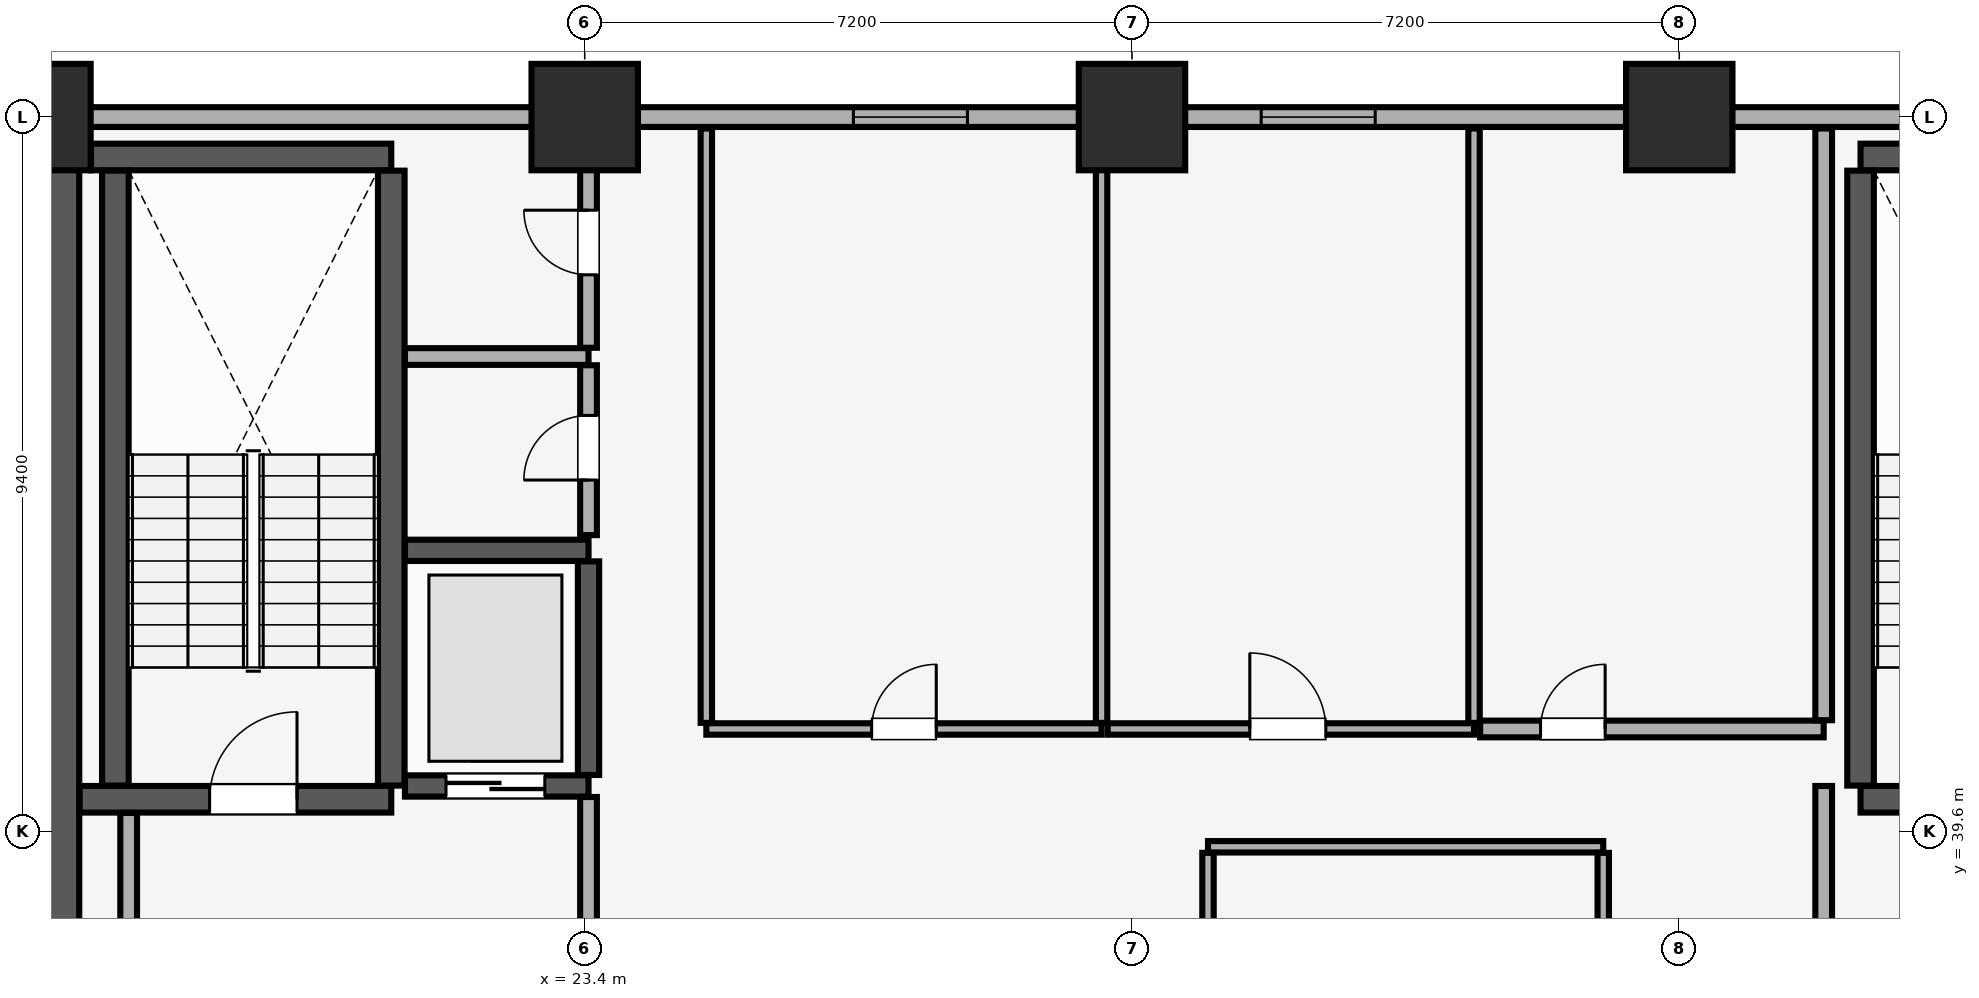
"""IFC4 building model, lengths in metres.
Left out: names, types, materials, properties, quantities, classifications, styles, units other than length and angle.
Written with IfcOpenShell. Run it as: python <this file> out.ifc"""

import sys

from ifc_helpers import new_model, si_unit, direction, frame, frame_2d, origin, origin_2d, place, context, subcontext, project, spatial, rectangle, extrude, element, fill, save


model = new_model("IFC4")
c1 = context("Model", 3, precision=1e-05, world=origin(), true_north=direction((0.0, 1.0)))
c2 = subcontext(c1, "Body", "Model", "MODEL_VIEW")
j1 = project(units=[si_unit("LENGTHUNIT", "METRE"), si_unit("PLANEANGLEUNIT", "RADIAN")], contexts=[c1])
p1 = place(None, origin())
s1 = spatial("IfcSite", under=j1, at=p1, CompositionType="ELEMENT")
p2 = place(p1, origin())
s2 = spatial("IfcBuilding", under=s1, at=p2, CompositionType="ELEMENT")
p3 = place(p2, frame((0.0, 0.0, 68.9)))
s3 = spatial("IfcBuildingStorey", under=s2, at=p3, CompositionType="ELEMENT", Elevation=68.9)
for number, where, z_axis, x_axis in (
    (1, (16.2, 49.0, 0.0), (0.0, 0.0, 1.0), (1.0, 0.0, 0.0)),
    (2, (23.4, 49.0, 0.0), (0.0, 0.0, 1.0), (1.0, 0.0, 0.0)),
    (3, (30.6, 49.0, 0.0), (0.0, 0.0, 1.0), (1.0, 0.0, 0.0)),
    (4, (37.8, 49.0, 0.0), (0.0, 0.0, 1.0), (1.0, 0.0, 0.0)),
):
    element("IfcColumn", number, at=place(p3, frame(where, z_axis=z_axis, x_axis=x_axis)), inside=s3, PredefinedType="COLUMN", context=c2, shape_type="SweptSolid", body=[
        extrude(rectangle(XDim=1.4, YDim=1.4, at=origin_2d()), origin(), (0.0, 0.0, 1.0), 3.51),
    ])
p4 = place(p3, frame((79.8, 49.0, 0.0), z_axis=(0.0, 0.0, 1.0), x_axis=(-1.0, 0.0, 0.0)))
e5 = element("IfcWall", 5, at=p4, inside=s3, PredefinedType="SOLIDWALL", context=c2, shape_type="SweptSolid", body=[
    extrude(rectangle(XDim=75.6, YDim=0.26, at=frame_2d((37.8, 0.0))), origin(), (0.0, 0.0, 1.0), 2.56),
])
p5 = place(p4, frame((72.565, 0.0, 0.85)))
e6 = element("IfcOpeningElement", 6, at=p5, cuts=e5, PredefinedType="OPENING", context=c2, shape_type="SweptSolid", body=[
    extrude(rectangle(XDim=1.5, YDim=1.4, at=frame_2d((0.75, 0.7))), frame((0.0, 0.14, 0.0), z_axis=(0.0, -1.0, 0.0), x_axis=(1.0, 0.0, 0.0)), (0.0, 0.0, 1.0), 0.28),
])
p6 = place(p4, frame((67.45, 0.0, 0.85)))
e7 = element("IfcOpeningElement", 7, at=p6, cuts=e5, PredefinedType="OPENING", context=c2, shape_type="SweptSolid", body=[
    extrude(rectangle(XDim=1.5, YDim=1.4, at=frame_2d((0.75, 0.7))), frame((0.0, 0.14, 0.0), z_axis=(0.0, -1.0, 0.0), x_axis=(1.0, 0.0, 0.0)), (0.0, 0.0, 1.0), 0.28),
])
p7 = place(p4, frame((6.65, 0.0, 0.85)))
e8 = element("IfcOpeningElement", 8, at=p7, cuts=e5, PredefinedType="OPENING", context=c2, shape_type="SweptSolid", body=[
    extrude(rectangle(XDim=1.5, YDim=1.4, at=frame_2d((0.75, 0.7))), frame((0.0, 0.14, 0.0), z_axis=(0.0, -1.0, 0.0), x_axis=(1.0, 0.0, 0.0)), (0.0, 0.0, 1.0), 0.28),
])
p8 = place(p4, frame((1.535, 0.0, 0.85)))
e9 = element("IfcOpeningElement", 9, at=p8, cuts=e5, PredefinedType="OPENING", context=c2, shape_type="SweptSolid", body=[
    extrude(rectangle(XDim=1.5, YDim=1.4, at=frame_2d((0.75, 0.7))), frame((0.0, 0.14, 0.0), z_axis=(0.0, -1.0, 0.0), x_axis=(1.0, 0.0, 0.0)), (0.0, 0.0, 1.0), 0.28),
])
p9 = place(p4, frame((51.365, 0.0, 0.9)))
e10 = element("IfcOpeningElement", 10, at=p9, cuts=e5, PredefinedType="OPENING", context=c2, shape_type="SweptSolid", body=[
    extrude(rectangle(XDim=1.5, YDim=1.4, at=frame_2d((0.75, 0.7))), frame((0.0, 0.14, 0.0), z_axis=(0.0, -1.0, 0.0), x_axis=(1.0, 0.0, 0.0)), (0.0, 0.0, 1.0), 0.28),
])
p10 = place(p4, frame((46.0, 0.0, 0.9)))
e11 = element("IfcOpeningElement", 11, at=p10, cuts=e5, PredefinedType="OPENING", context=c2, shape_type="SweptSolid", body=[
    extrude(rectangle(XDim=1.5, YDim=1.4, at=frame_2d((0.75, 0.7))), frame((0.0, 0.14, 0.0), z_axis=(0.0, -1.0, 0.0), x_axis=(1.0, 0.0, 0.0)), (0.0, 0.0, 1.0), 0.28),
])
p11 = place(p4, frame((29.15, 0.0, 0.9)))
e12 = element("IfcOpeningElement", 12, at=p11, cuts=e5, PredefinedType="OPENING", context=c2, shape_type="SweptSolid", body=[
    extrude(rectangle(XDim=1.5, YDim=1.4, at=frame_2d((0.75, 0.7))), frame((0.0, 0.14, 0.0), z_axis=(0.0, -1.0, 0.0), x_axis=(1.0, 0.0, 0.0)), (0.0, 0.0, 1.0), 0.28),
])
p12 = place(p4, frame((23.485, 0.0, 0.9)))
e13 = element("IfcOpeningElement", 13, at=p12, cuts=e5, PredefinedType="OPENING", context=c2, shape_type="SweptSolid", body=[
    extrude(rectangle(XDim=1.5, YDim=1.4, at=frame_2d((0.75, 0.7))), frame((0.0, 0.14, 0.0), z_axis=(0.0, -1.0, 0.0), x_axis=(1.0, 0.0, 0.0)), (0.0, 0.0, 1.0), 0.28),
])
p13 = place(p3, frame((16.2, 29.4, 0.0), z_axis=(0.0, 0.0, 1.0), x_axis=(0.0, 1.0, 0.0)))
e14 = element("IfcWall", 14, at=p13, inside=s3, PredefinedType="SHEAR", context=c2, shape_type="SweptSolid", body=[
    extrude(rectangle(XDim=19.2, YDim=1.1, at=frame_2d((9.6, 0.0))), origin(), (0.0, 0.0, 1.0), 3.51),
])
p14 = place(p3, frame((16.755, 40.025, 0.0), z_axis=(0.0, 0.0, 1.0), x_axis=(1.0, 0.0, 0.0)))
e15 = element("IfcWall", 15, at=p14, inside=s3, PredefinedType="SHEAR", context=c2, shape_type="SweptSolid", body=[
    extrude(rectangle(XDim=4.1, YDim=0.35, at=frame_2d((2.05, 0.0))), origin(), (0.0, 0.0, 1.0), 3.51),
])
p15 = place(p14, frame((1.71, 0.0, 0.0)))
e16 = element("IfcOpeningElement", 16, at=p15, cuts=e15, PredefinedType="OPENING", context=c2, shape_type="SweptSolid", body=[
    extrude(rectangle(XDim=1.15, YDim=2.15, at=frame_2d((0.575, 1.075))), frame((0.0, 0.185, 0.0), z_axis=(0.0, -1.0, 0.0), x_axis=(1.0, 0.0, 0.0)), (0.0, 0.0, 1.0), 0.37),
])
p16 = place(p3, frame((16.905, 48.475, 0.0), z_axis=(0.0, 0.0, 1.0), x_axis=(1.0, 0.0, 0.0)))
e17 = element("IfcWall", 17, at=p16, inside=s3, PredefinedType="SHEAR", context=c2, shape_type="SweptSolid", body=[
    extrude(rectangle(XDim=3.95, YDim=0.35, at=frame_2d((1.975, 0.0))), origin(), (0.0, 0.0, 1.0), 3.51),
])
for number, where, z_axis, x_axis in (
    (18, (17.225, 40.205, 0.0), (0.0, 0.0, 1.0), (0.0, 1.0, 0.0)),
    (19, (20.855, 40.205, 0.0), (0.0, 0.0, 1.0), (0.0, 1.0, 0.0)),
):
    element("IfcWall", number, at=place(p3, frame(where, z_axis=z_axis, x_axis=x_axis)), inside=s3, PredefinedType="SHEAR", context=c2, shape_type="SweptSolid", body=[
        extrude(rectangle(XDim=8.09, YDim=0.35, at=frame_2d((4.045, 0.0))), origin(), (0.0, 0.0, 1.0), 3.51),
    ])
p17 = place(p3, frame((40.185, 40.025, 0.0), z_axis=(0.0, 0.0, 1.0), x_axis=(1.0, 0.0, 0.0)))
e20 = element("IfcWall", 20, at=p17, inside=s3, PredefinedType="SHEAR", context=c2, shape_type="SweptSolid", body=[
    extrude(rectangle(XDim=3.63, YDim=0.35, at=frame_2d((1.815, 0.0))), origin(), (0.0, 0.0, 1.0), 3.51),
])
p18 = place(p17, frame((1.24, 0.0, 0.0)))
e21 = element("IfcOpeningElement", 21, at=p18, cuts=e20, PredefinedType="OPENING", context=c2, shape_type="SweptSolid", body=[
    extrude(rectangle(XDim=1.15, YDim=2.15, at=frame_2d((0.575, 1.075))), frame((0.0, 0.185, 0.0), z_axis=(0.0, -1.0, 0.0), x_axis=(1.0, 0.0, 0.0)), (0.0, 0.0, 1.0), 0.37),
])
p19 = place(p3, frame((40.185, 48.475, 0.0), z_axis=(0.0, 0.0, 1.0), x_axis=(1.0, 0.0, 0.0)))
e22 = element("IfcWall", 22, at=p19, inside=s3, PredefinedType="SHEAR", context=c2, shape_type="SweptSolid", body=[
    extrude(rectangle(XDim=3.63, YDim=0.35, at=frame_2d((1.815, 0.0))), origin(), (0.0, 0.0, 1.0), 3.51),
])
p20 = place(p3, frame((40.185, 40.205, 0.0), z_axis=(0.0, 0.0, 1.0), x_axis=(0.0, 1.0, 0.0)))
e23 = element("IfcWall", 23, at=p20, inside=s3, PredefinedType="SHEAR", context=c2, shape_type="SweptSolid", body=[
    extrude(rectangle(XDim=8.09, YDim=0.35, at=frame_2d((4.045, 0.0))), origin(), (0.0, 0.0, 1.0), 3.51),
])
p21 = place(p3, frame((21.035, 40.2, 0.0), z_axis=(0.0, 0.0, 1.0), x_axis=(1.0, 0.0, 0.0)))
e24 = element("IfcWall", 24, at=p21, inside=s3, PredefinedType="SHEAR", context=c2, shape_type="SweptSolid", body=[
    extrude(rectangle(XDim=2.415, YDim=0.28, at=frame_2d((1.208, 0.0))), origin(), (0.0, 0.0, 1.0), 3.51),
])
p22 = place(p21, frame((0.54, 0.0, 0.0)))
e25 = element("IfcOpeningElement", 25, at=p22, cuts=e24, PredefinedType="OPENING", context=c2, shape_type="SweptSolid", body=[
    extrude(rectangle(XDim=1.3, YDim=2.3, at=frame_2d((0.65, 1.15))), frame((0.0, 0.15, 0.0), z_axis=(0.0, -1.0, 0.0), x_axis=(1.0, 0.0, 0.0)), (0.0, 0.0, 1.0), 0.3),
])
p23 = place(p3, frame((21.035, 43.3, 0.0), z_axis=(0.0, 0.0, 1.0), x_axis=(1.0, 0.0, 0.0)))
e26 = element("IfcWall", 26, at=p23, inside=s3, PredefinedType="SHEAR", context=c2, shape_type="SweptSolid", body=[
    extrude(rectangle(XDim=2.415, YDim=0.28, at=frame_2d((1.208, 0.0))), origin(), (0.0, 0.0, 1.0), 3.51),
])
p24 = place(p3, frame((23.45, 40.345, 0.0), z_axis=(0.0, 0.0, 1.0), x_axis=(0.0, 1.0, 0.0)))
e27 = element("IfcWall", 27, at=p24, inside=s3, PredefinedType="SHEAR", context=c2, shape_type="SweptSolid", body=[
    extrude(rectangle(XDim=2.81, YDim=0.28, at=frame_2d((1.405, 0.0))), origin(), (0.0, 0.0, 1.0), 3.51),
])
p25 = place(p3, frame((17.4, 34.415, 0.0), z_axis=(0.0, 0.0, 1.0), x_axis=(0.0, 1.0, 0.0)))
e28 = element("IfcWall", 28, at=p25, inside=s3, PredefinedType="PARTITIONING", context=c2, shape_type="SweptSolid", body=[
    extrude(rectangle(XDim=5.43, YDim=0.22, at=frame_2d((2.715, 0.0))), origin(), (0.0, 0.0, 1.0), 3.51),
])
p26 = place(p3, frame((23.45, 34.415, 0.0), z_axis=(0.0, 0.0, 1.0), x_axis=(0.0, 1.0, 0.0)))
e29 = element("IfcWall", 29, at=p26, inside=s3, PredefinedType="PARTITIONING", context=c2, shape_type="SweptSolid", body=[
    extrude(rectangle(XDim=5.64, YDim=0.22, at=frame_2d((2.82, 0.0))), origin(), (0.0, 0.0, 1.0), 3.51),
])
p27 = place(p3, frame((39.7, 34.415, 0.0), z_axis=(0.0, 0.0, 1.0), x_axis=(0.0, 1.0, 0.0)))
e30 = element("IfcWall", 30, at=p27, inside=s3, PredefinedType="PARTITIONING", context=c2, shape_type="SweptSolid", body=[
    extrude(rectangle(XDim=5.785, YDim=0.22, at=frame_2d((2.893, 0.0))), origin(), (0.0, 0.0, 1.0), 3.51),
])
p28 = place(p3, frame((21.035, 45.85, 0.0), z_axis=(0.0, 0.0, 1.0), x_axis=(1.0, 0.0, 0.0)))
e31 = element("IfcWall", 31, at=p28, inside=s3, PredefinedType="PARTITIONING", context=c2, shape_type="SweptSolid", body=[
    extrude(rectangle(XDim=2.415, YDim=0.22, at=frame_2d((1.208, 0.0))), origin(), (0.0, 0.0, 1.0), 3.51),
])
p29 = place(p3, frame((23.45, 43.5, 0.0), z_axis=(0.0, 0.0, 1.0), x_axis=(0.0, 1.0, 0.0)))
e32 = element("IfcWall", 32, at=p29, inside=s3, PredefinedType="PARTITIONING", context=c2, shape_type="SweptSolid", body=[
    extrude(rectangle(XDim=2.235, YDim=0.22, at=frame_2d((1.118, 0.0))), origin(), (0.0, 0.0, 1.0), 3.51),
])
p30 = place(p29, frame((0.725, 0.0, 0.0)))
e33 = element("IfcOpeningElement", 33, at=p30, cuts=e32, PredefinedType="OPENING", context=c2, shape_type="SweptSolid", body=[
    extrude(rectangle(XDim=0.85, YDim=2.1, at=frame_2d((0.425, 1.05))), frame((0.0, 0.12, 0.0), z_axis=(0.0, -1.0, 0.0), x_axis=(1.0, 0.0, 0.0)), (0.0, 0.0, 1.0), 0.24),
])
p31 = place(p3, frame((23.45, 45.965, 0.0), z_axis=(0.0, 0.0, 1.0), x_axis=(0.0, 1.0, 0.0)))
e34 = element("IfcWall", 34, at=p31, inside=s3, PredefinedType="PARTITIONING", context=c2, shape_type="SweptSolid", body=[
    extrude(rectangle(XDim=2.885, YDim=0.22, at=frame_2d((1.442, 0.0))), origin(), (0.0, 0.0, 1.0), 3.51),
])
p32 = place(p31, frame((0.96, 0.0, 0.0)))
e35 = element("IfcOpeningElement", 35, at=p32, cuts=e34, PredefinedType="OPENING", context=c2, shape_type="SweptSolid", body=[
    extrude(rectangle(XDim=0.85, YDim=2.1, at=frame_2d((0.425, 1.05))), frame((0.0, 0.12, 0.0), z_axis=(0.0, -1.0, 0.0), x_axis=(1.0, 0.0, 0.0)), (0.0, 0.0, 1.0), 0.24),
])
p33 = place(p3, frame((31.6, 39.4, 0.0), z_axis=(0.0, 0.0, 1.0), x_axis=(1.0, 0.0, 0.0)))
e36 = element("IfcWall", 36, at=p33, inside=s3, PredefinedType="PARTITIONING", context=c2, shape_type="SweptSolid", body=[
    extrude(rectangle(XDim=5.2, YDim=0.15, at=frame_2d((2.6, 0.0))), origin(), (0.0, 0.0, 1.0), 3.51),
])
for number, where, z_axis, x_axis in (
    (37, (31.6, 34.38, 0.0), (0.0, 0.0, 1.0), (0.0, 1.0, 0.0)),
    (38, (36.8, 34.38, 0.0), (0.0, 0.0, 1.0), (0.0, 1.0, 0.0)),
):
    element("IfcWall", number, at=place(p3, frame(where, z_axis=z_axis, x_axis=x_axis)), inside=s3, PredefinedType="PARTITIONING", context=c2, shape_type="SweptSolid", body=[
        extrude(rectangle(XDim=4.94, YDim=0.15, at=frame_2d((2.47, 0.0))), origin(), (0.0, 0.0, 1.0), 3.51),
    ])
p34 = place(p3, frame((25.0, 40.95, 0.0), z_axis=(0.0, 0.0, 1.0), x_axis=(1.0, 0.0, 0.0)))
e39 = element("IfcWall", 39, at=p34, inside=s3, PredefinedType="PARTITIONING", context=c2, shape_type="SweptSolid", body=[
    extrude(rectangle(XDim=5.2, YDim=0.15, at=frame_2d((2.6, 0.0))), origin(), (0.0, 0.0, 1.0), 3.51),
])
p35 = place(p34, frame((2.175, 0.0, 0.0)))
e40 = element("IfcOpeningElement", 40, at=p35, cuts=e39, PredefinedType="OPENING", context=c2, shape_type="SweptSolid", body=[
    extrude(rectangle(XDim=0.85, YDim=2.1, at=frame_2d((0.425, 1.05))), frame((0.0, 0.085, 0.0), z_axis=(0.0, -1.0, 0.0), x_axis=(1.0, 0.0, 0.0)), (0.0, 0.0, 1.0), 0.17),
])
for number, where, z_axis, x_axis in (
    (41, (25.0, 41.03, 0.0), (0.0, 0.0, 1.0), (0.0, 1.0, 0.0)),
    (42, (30.2, 41.03, 0.0), (0.0, 0.0, 1.0), (0.0, 1.0, 0.0)),
):
    element("IfcWall", number, at=place(p3, frame(where, z_axis=z_axis, x_axis=x_axis)), inside=s3, PredefinedType="PARTITIONING", context=c2, shape_type="SweptSolid", body=[
        extrude(rectangle(XDim=7.82, YDim=0.15, at=frame_2d((3.91, 0.0))), origin(), (0.0, 0.0, 1.0), 3.51),
    ])
p36 = place(p3, frame((30.28, 40.95, 0.0), z_axis=(0.0, 0.0, 1.0), x_axis=(1.0, 0.0, 0.0)))
e43 = element("IfcWall", 43, at=p36, inside=s3, PredefinedType="PARTITIONING", context=c2, shape_type="SweptSolid", body=[
    extrude(rectangle(XDim=4.82, YDim=0.15, at=frame_2d((2.41, 0.0))), origin(), (0.0, 0.0, 1.0), 3.51),
])
p37 = place(p36, frame((1.87, 0.0, 0.0)))
e44 = element("IfcOpeningElement", 44, at=p37, cuts=e43, PredefinedType="OPENING", context=c2, shape_type="SweptSolid", body=[
    extrude(rectangle(XDim=1.0, YDim=2.15, at=frame_2d((0.5, 1.075))), frame((0.0, 0.085, 0.0), z_axis=(0.0, -1.0, 0.0), x_axis=(1.0, 0.0, 0.0)), (0.0, 0.0, 1.0), 0.17),
])
p38 = place(p3, frame((35.1, 41.03, 0.0), z_axis=(0.0, 0.0, 1.0), x_axis=(0.0, 1.0, 0.0)))
e45 = element("IfcWall", 45, at=p38, inside=s3, PredefinedType="PARTITIONING", context=c2, shape_type="SweptSolid", body=[
    extrude(rectangle(XDim=7.82, YDim=0.15, at=frame_2d((3.91, 0.0))), origin(), (0.0, 0.0, 1.0), 3.51),
])
p39 = place(p3, frame((35.18, 40.95, 0.0), z_axis=(0.0, 0.0, 1.0), x_axis=(1.0, 0.0, 0.0)))
e46 = element("IfcWall", 46, at=p39, inside=s3, PredefinedType="PARTITIONING", context=c2, shape_type="SweptSolid", body=[
    extrude(rectangle(XDim=4.52, YDim=0.22, at=frame_2d((2.26, 0.0))), origin(), (0.0, 0.0, 1.0), 3.51),
])
p40 = place(p39, frame((0.795, 0.0, 0.0)))
e47 = element("IfcOpeningElement", 47, at=p40, cuts=e46, PredefinedType="OPENING", context=c2, shape_type="SweptSolid", body=[
    extrude(rectangle(XDim=0.85, YDim=2.1, at=frame_2d((0.425, 1.05))), frame((0.0, 0.12, 0.0), z_axis=(0.0, -1.0, 0.0), x_axis=(1.0, 0.0, 0.0)), (0.0, 0.0, 1.0), 0.24),
])
p41 = place(p3, frame((39.7, 41.065, 0.0), z_axis=(0.0, 0.0, 1.0), x_axis=(0.0, 1.0, 0.0)))
e48 = element("IfcWall", 48, at=p41, inside=s3, PredefinedType="PARTITIONING", context=c2, shape_type="SweptSolid", body=[
    extrude(rectangle(XDim=7.785, YDim=0.22, at=frame_2d((3.893, 0.0))), origin(), (0.0, 0.0, 1.0), 3.51),
])
p42 = place(p9, origin())
e49 = element("IfcWindow", 49, at=p42, inside=s3, PartitioningType="SINGLE_PANEL", PredefinedType="WINDOW", context=c2, shape_type="SweptSolid", body=[
    extrude(rectangle(XDim=1.5, YDim=1.4, at=frame_2d((0.75, 0.7))), frame((0.0, 0.03, 0.0), z_axis=(0.0, -1.0, 0.0), x_axis=(1.0, 0.0, 0.0)), (0.0, 0.0, 1.0), 0.06),
])
fill(e10, e49)
p43 = place(p10, origin())
e50 = element("IfcWindow", 50, at=p43, inside=s3, PartitioningType="SINGLE_PANEL", PredefinedType="WINDOW", context=c2, shape_type="SweptSolid", body=[
    extrude(rectangle(XDim=1.5, YDim=1.4, at=frame_2d((0.75, 0.7))), frame((0.0, 0.03, 0.0), z_axis=(0.0, -1.0, 0.0), x_axis=(1.0, 0.0, 0.0)), (0.0, 0.0, 1.0), 0.06),
])
fill(e11, e50)
p44 = place(p15, origin())
e51 = element("IfcDoor", 51, at=p44, inside=s3, OperationType="SINGLE_SWING_RIGHT", PredefinedType="DOOR", context=c2, shape_type="SweptSolid", body=[
    extrude(rectangle(XDim=1.15, YDim=2.15, at=frame_2d((0.575, 1.075))), frame((0.0, 0.025, 0.0), z_axis=(0.0, -1.0, 0.0), x_axis=(1.0, 0.0, 0.0)), (0.0, 0.0, 1.0), 0.05),
])
fill(e16, e51)
p45 = place(p22, origin())
e52 = element("IfcDoor", 52, at=p45, inside=s3, OperationType="DOUBLE_DOOR_SLIDING", PredefinedType="DOOR", context=c2, shape_type="SweptSolid", body=[
    extrude(rectangle(XDim=1.3, YDim=2.3, at=frame_2d((0.65, 1.15))), frame((0.0, 0.025, 0.0), z_axis=(0.0, -1.0, 0.0), x_axis=(1.0, 0.0, 0.0)), (0.0, 0.0, 1.0), 0.05),
])
fill(e25, e52)
p46 = place(p30, origin())
e53 = element("IfcDoor", 53, at=p46, inside=s3, OperationType="SINGLE_SWING_LEFT", PredefinedType="DOOR", context=c2, shape_type="SweptSolid", body=[
    extrude(rectangle(XDim=0.85, YDim=2.1, at=frame_2d((0.425, 1.05))), frame((0.0, 0.025, 0.0), z_axis=(0.0, -1.0, 0.0), x_axis=(1.0, 0.0, 0.0)), (0.0, 0.0, 1.0), 0.05),
])
fill(e33, e53)
p47 = place(p32, origin())
e54 = element("IfcDoor", 54, at=p47, inside=s3, OperationType="SINGLE_SWING_RIGHT", PredefinedType="DOOR", context=c2, shape_type="SweptSolid", body=[
    extrude(rectangle(XDim=0.85, YDim=2.1, at=frame_2d((0.425, 1.05))), frame((0.0, 0.025, 0.0), z_axis=(0.0, -1.0, 0.0), x_axis=(1.0, 0.0, 0.0)), (0.0, 0.0, 1.0), 0.05),
])
fill(e35, e54)
p48 = place(p35, origin())
e55 = element("IfcDoor", 55, at=p48, inside=s3, OperationType="SINGLE_SWING_RIGHT", PredefinedType="DOOR", context=c2, shape_type="SweptSolid", body=[
    extrude(rectangle(XDim=0.85, YDim=2.1, at=frame_2d((0.425, 1.05))), frame((0.0, 0.025, 0.0), z_axis=(0.0, -1.0, 0.0), x_axis=(1.0, 0.0, 0.0)), (0.0, 0.0, 1.0), 0.05),
])
fill(e40, e55)
p49 = place(p37, origin())
e56 = element("IfcDoor", 56, at=p49, inside=s3, OperationType="SINGLE_SWING_LEFT", PredefinedType="DOOR", context=c2, shape_type="SweptSolid", body=[
    extrude(rectangle(XDim=1.0, YDim=2.15, at=frame_2d((0.5, 1.075))), frame((0.0, 0.025, 0.0), z_axis=(0.0, -1.0, 0.0), x_axis=(1.0, 0.0, 0.0)), (0.0, 0.0, 1.0), 0.05),
])
fill(e44, e56)
p50 = place(p40, origin())
e57 = element("IfcDoor", 57, at=p50, inside=s3, OperationType="SINGLE_SWING_RIGHT", PredefinedType="DOOR", context=c2, shape_type="SweptSolid", body=[
    extrude(rectangle(XDim=0.85, YDim=2.1, at=frame_2d((0.425, 1.05))), frame((0.0, 0.025, 0.0), z_axis=(0.0, -1.0, 0.0), x_axis=(1.0, 0.0, 0.0)), (0.0, 0.0, 1.0), 0.05),
])
fill(e47, e57)
save(model, sys.argv[1])
